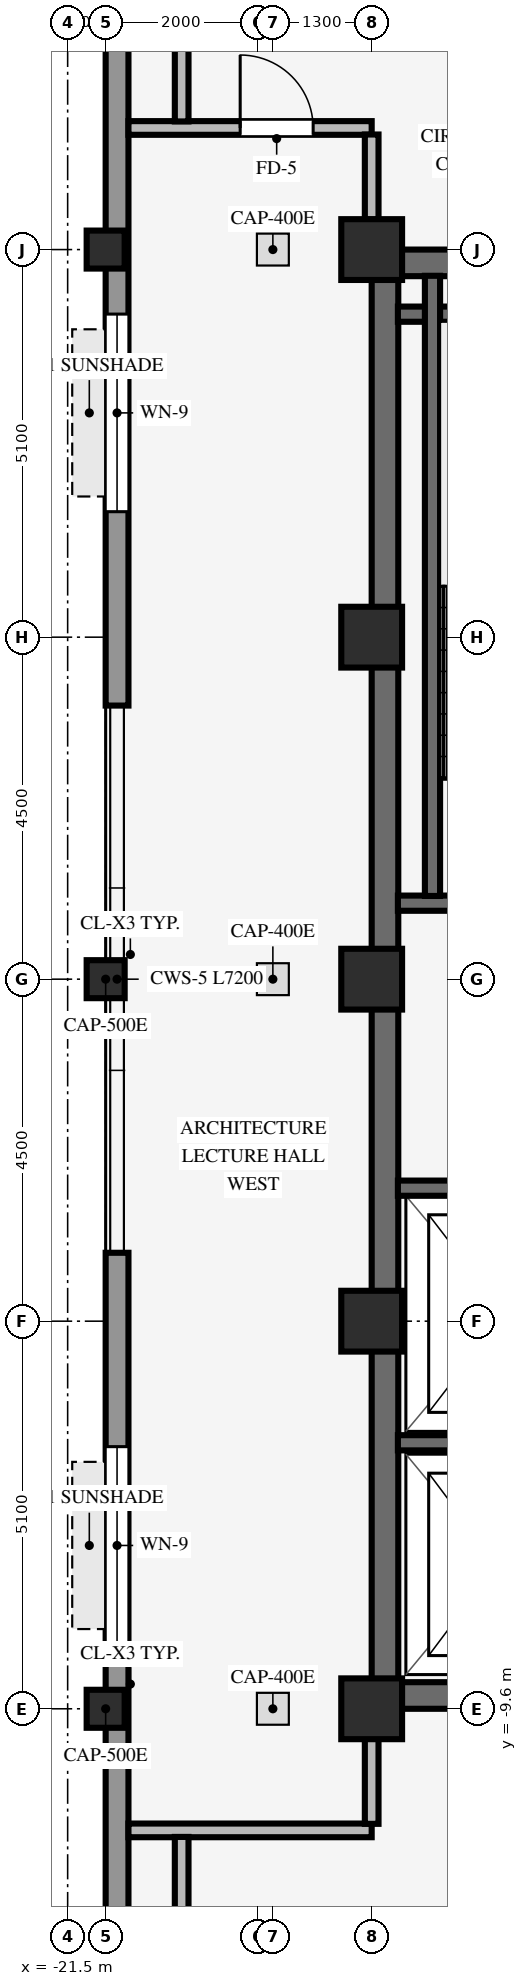
"""IFC4 building model, lengths in metres.
Left out: names, types, materials, properties, quantities, classifications, styles, units other than length and angle.
Written with IfcOpenShell. Run it as: python <this file> out.ifc"""

import sys

from ifc_helpers import new_model, si_unit, direction, frame, frame_2d, origin, origin_2d, place, context, subcontext, project, spatial, rectangle, hollow_rectangle, extrude, source, transform, mapped, element, fill, save


model = new_model("IFC4")
c1 = context("Model", 3, precision=1e-05, world=origin(), true_north=direction((0.0, 1.0)))
c2 = subcontext(c1, "Body", "Model", "MODEL_VIEW")
j1 = project(units=[si_unit("LENGTHUNIT", "METRE"), si_unit("PLANEANGLEUNIT", "RADIAN")], contexts=[c1])
p1 = place(None, origin())
s1 = spatial("IfcSite", under=j1, at=p1, CompositionType="ELEMENT")
p2 = place(p1, origin())
s2 = spatial("IfcBuilding", under=s1, at=p2, CompositionType="ELEMENT")
p3 = place(p2, frame((0.0, 0.0, 283.5)))
s3 = spatial("IfcBuildingStorey", under=s2, at=p3, CompositionType="ELEMENT", Elevation=283.5)
for number, where, z_axis, x_axis in (
    (1, (-17.5, -9.425, 0.0), (0.0, 0.0, 1.0), (1.0, 0.0, 0.0)),
    (2, (-17.5, 9.425, 0.0), (0.0, 0.0, 1.0), (1.0, 0.0, 0.0)),
):
    element("IfcWall", number, at=place(p3, frame(where, z_axis=z_axis, x_axis=x_axis)), inside=s3, PredefinedType="SHEAR", context=c2, shape_type="SweptSolid", body=[
        extrude(rectangle(XDim=8.5, YDim=0.35, at=frame_2d((4.25, 0.0))), origin(), (0.0, 0.0, 1.0), 3.25),
    ])
p4 = place(p3, frame((-17.325, -9.255, 0.0), z_axis=(0.0, 0.0, 1.0), x_axis=(0.0, 1.0, 0.0)))
e3 = element("IfcWall", 3, at=p4, inside=s3, PredefinedType="SHEAR", context=c2, shape_type="SweptSolid", body=[
    extrude(rectangle(XDim=18.51, YDim=0.35, at=frame_2d((9.255, 0.0))), origin(), (0.0, 0.0, 1.0), 3.25),
])
for number, where, z_axis, x_axis in (
    (4, (-17.5, -9.6, 0.0), (0.0, 0.0, 1.0), (1.0, 0.0, 0.0)),
    (5, (-17.5, -4.5, 0.0), (0.0, 0.0, 1.0), (1.0, 0.0, 0.0)),
    (6, (-17.5, 4.5, 0.0), (0.0, 0.0, 1.0), (1.0, 0.0, 0.0)),
    (7, (-17.5, 9.6, 0.0), (0.0, 0.0, 1.0), (1.0, 0.0, 0.0)),
    (8, (-17.5, 0.0, 0.0), (0.0, 0.0, 1.0), (1.0, 0.0, 0.0)),
):
    element("IfcColumn", number, at=place(p3, frame(where, z_axis=z_axis, x_axis=x_axis)), inside=s3, PredefinedType="COLUMN", context=c2, shape_type="SweptSolid", body=[
        extrude(rectangle(XDim=0.8, YDim=0.8, at=origin_2d()), origin(), (0.0, 0.0, 1.0), 3.25),
    ])
for number, where, z_axis, x_axis in (
    (9, (-21.0, -9.6, 0.0), (0.0, 0.0, 1.0), (1.0, 0.0, 0.0)),
    (10, (-21.0, 0.0, 0.0), (0.0, 0.0, 1.0), (1.0, 0.0, 0.0)),
    (11, (-21.0, 9.6, 0.0), (0.0, 0.0, 1.0), (1.0, 0.0, 0.0)),
):
    element("IfcColumn", number, at=place(p3, frame(where, z_axis=z_axis, x_axis=x_axis)), inside=s3, PredefinedType="COLUMN", context=c2, shape_type="SweptSolid", body=[
        extrude(hollow_rectangle(XDim=0.5, YDim=0.5, WallThickness=0.032, InnerFilletRadius=0.032, OuterFilletRadius=0.064, at=origin_2d()), origin(), (0.0, 0.0, 1.0), 3.25),
    ])
p5 = place(p3, frame((-20.85, -17.004, 0.0), z_axis=(0.0, 0.0, 1.0), x_axis=(0.0, 1.0, 0.0)))
e12 = element("IfcWall", 12, at=p5, inside=s3, PredefinedType="STANDARD", context=c2, shape_type="SweptSolid", body=[
    extrude(rectangle(XDim=13.404, YDim=0.3, at=frame_2d((6.702, 0.0))), origin(), (0.0, 0.0, 1.0), 3.24),
])
p6 = place(p5, frame((8.253, 0.0, 0.8)))
e13 = element("IfcOpeningElement", 13, at=p6, cuts=e12, PredefinedType="OPENING", context=c2, shape_type="SweptSolid", body=[
    extrude(rectangle(XDim=2.6, YDim=1.9, at=frame_2d((1.3, 0.95))), frame((0.0, 0.16, 0.0), z_axis=(0.0, -1.0, 0.0), x_axis=(1.0, 0.0, 0.0)), (0.0, 0.0, 1.0), 0.32),
])
p7 = place(p3, frame((-20.85, 3.6, 0.0), z_axis=(0.0, 0.0, 1.0), x_axis=(0.0, 1.0, 0.0)))
e14 = element("IfcWall", 14, at=p7, inside=s3, PredefinedType="STANDARD", context=c2, shape_type="SweptSolid", body=[
    extrude(rectangle(XDim=13.404, YDim=0.3, at=frame_2d((6.702, 0.0))), origin(), (0.0, 0.0, 1.0), 3.24),
])
p8 = place(p7, frame((2.551, 0.0, 0.8)))
e15 = element("IfcOpeningElement", 15, at=p8, cuts=e14, PredefinedType="OPENING", context=c2, shape_type="SweptSolid", body=[
    extrude(rectangle(XDim=2.6, YDim=1.9, at=frame_2d((1.3, 0.95))), frame((0.0, 0.16, 0.0), z_axis=(0.0, -1.0, 0.0), x_axis=(1.0, 0.0, 0.0)), (0.0, 0.0, 1.0), 0.32),
])
for number, where, z_axis, x_axis in (
    (16, (-17.155, 1.0, 0.0), (0.0, 0.0, 1.0), (1.0, 0.0, 0.0)),
    (17, (-17.155, 8.75, 0.0), (0.0, 0.0, 1.0), (1.0, 0.0, 0.0)),
):
    element("IfcWall", number, at=place(p3, frame(where, z_axis=z_axis, x_axis=x_axis)), inside=s3, PredefinedType="SHEAR", context=c2, shape_type="SweptSolid", body=[
        extrude(rectangle(XDim=3.62, YDim=0.2, at=frame_2d((1.81, 0.0))), origin(), (0.0, 0.0, 1.0), 3.25),
    ])
p9 = place(p3, frame((-16.7, 1.095, 0.0), z_axis=(0.0, 0.0, 1.0), x_axis=(0.0, 1.0, 0.0)))
e18 = element("IfcWall", 18, at=p9, inside=s3, PredefinedType="SHEAR", context=c2, shape_type="SweptSolid", body=[
    extrude(rectangle(XDim=8.16, YDim=0.2, at=frame_2d((4.08, 0.0))), origin(), (0.0, 0.0, 1.0), 3.25),
])
p10 = place(p3, frame((-17.155, -6.1, 0.0), z_axis=(0.0, 0.0, 1.0), x_axis=(1.0, 0.0, 0.0)))
e19 = element("IfcWall", 19, at=p10, inside=s3, PredefinedType="SHEAR", context=c2, shape_type="SweptSolid", body=[
    extrude(rectangle(XDim=2.905, YDim=0.2, at=frame_2d((1.453, 0.0))), origin(), (0.0, 0.0, 1.0), 3.25),
])
p11 = place(p3, frame((-17.155, -2.75, 0.0), z_axis=(0.0, 0.0, 1.0), x_axis=(1.0, 0.0, 0.0)))
e20 = element("IfcWall", 20, at=p11, inside=s3, PredefinedType="SHEAR", context=c2, shape_type="SweptSolid", body=[
    extrude(rectangle(XDim=2.71, YDim=0.2, at=frame_2d((1.355, 0.0))), origin(), (0.0, 0.0, 1.0), 3.25),
])
p12 = place(p3, frame((-20.7, -11.2, 0.0), z_axis=(0.0, 0.0, 1.0), x_axis=(1.0, 0.0, 0.0)))
e21 = element("IfcWall", 21, at=p12, inside=s3, PredefinedType="PARTITIONING", context=c2, shape_type="SweptSolid", body=[
    extrude(rectangle(XDim=3.2, YDim=0.18, at=frame_2d((1.6, 0.0))), origin(), (0.0, 0.0, 1.0), 3.24),
])
p13 = place(p3, frame((-20.7, 11.2, 0.0), z_axis=(0.0, 0.0, 1.0), x_axis=(1.0, 0.0, 0.0)))
e22 = element("IfcWall", 22, at=p13, inside=s3, PredefinedType="PARTITIONING", context=c2, shape_type="SweptSolid", body=[
    extrude(rectangle(XDim=3.2, YDim=0.18, at=frame_2d((1.6, 0.0))), origin(), (0.0, 0.0, 1.0), 3.24),
])
p14 = place(p13, frame((1.47, 0.0, 0.0)))
e23 = element("IfcOpeningElement", 23, at=p14, cuts=e22, PredefinedType="OPENING", context=c2, shape_type="SweptSolid", body=[
    extrude(rectangle(XDim=0.96, YDim=2.1, at=frame_2d((0.48, 1.05))), frame((0.0, 0.1, 0.0), z_axis=(0.0, -1.0, 0.0), x_axis=(1.0, 0.0, 0.0)), (0.0, 0.0, 1.0), 0.2),
])
for number, where, z_axis, x_axis in (
    (24, (-20.0, -13.514, 0.0), (0.0, 0.0, 1.0), (0.0, 1.0, 0.0)),
    (25, (-20.0, 11.286, 0.0), (0.0, 0.0, 1.0), (0.0, 1.0, 0.0)),
):
    element("IfcWall", number, at=place(p3, frame(where, z_axis=z_axis, x_axis=x_axis)), inside=s3, PredefinedType="PARTITIONING", context=c2, shape_type="SweptSolid", body=[
        extrude(rectangle(XDim=2.228, YDim=0.18, at=frame_2d((1.114, 0.0))), origin(), (0.0, 0.0, 1.0), 3.24),
    ])
for number, where, z_axis, x_axis in (
    (26, (-17.5, -11.114, 0.0), (0.0, 0.0, 1.0), (0.0, 1.0, 0.0)),
    (27, (-17.5, 9.996, 0.0), (0.0, 0.0, 1.0), (0.0, 1.0, 0.0)),
):
    element("IfcWall", number, at=place(p3, frame(where, z_axis=z_axis, x_axis=x_axis)), inside=s3, PredefinedType="PARTITIONING", context=c2, shape_type="SweptSolid", body=[
        extrude(rectangle(XDim=1.118, YDim=0.18, at=frame_2d((0.559, 0.0))), origin(), (0.0, 0.0, 1.0), 3.24),
    ])
m1 = source(origin(), c2, "Body", "SweptSolid", [
    extrude(rectangle(XDim=2.6, YDim=1.9, at=frame_2d((1.3, 0.95))), frame((0.0, 0.03, 0.0), z_axis=(0.0, -1.0, 0.0), x_axis=(1.0, 0.0, 0.0)), (0.0, 0.0, 1.0), 0.06),
])
p15 = place(p6, origin())
e28 = element("IfcWindow", 28, at=p15, inside=s3, PartitioningType="SINGLE_PANEL", PredefinedType="WINDOW", context=c2, shape_type="MappedRepresentation", body=[
    mapped(m1, transform((0.0, 0.0, 0.0), scale=1.0)),
])
fill(e13, e28)
p16 = place(p8, origin())
e29 = element("IfcWindow", 29, at=p16, inside=s3, PartitioningType="SINGLE_PANEL", PredefinedType="WINDOW", context=c2, shape_type="MappedRepresentation", body=[
    mapped(m1, transform((0.0, 0.0, 0.0), scale=1.0)),
])
fill(e15, e29)
m2 = source(origin(), c2, "Body", "SweptSolid", [
    extrude(rectangle(XDim=0.96, YDim=2.1, at=frame_2d((0.48, 1.05))), frame((0.0, 0.025, 0.0), z_axis=(0.0, -1.0, 0.0), x_axis=(1.0, 0.0, 0.0)), (0.0, 0.0, 1.0), 0.05),
])
p17 = place(p14, origin())
e30 = element("IfcDoor", 30, at=p17, inside=s3, OperationType="SINGLE_SWING_LEFT", PredefinedType="DOOR", context=c2, shape_type="MappedRepresentation", body=[
    mapped(m2, transform((0.0, 0.0, 0.0), scale=1.0)),
])
fill(e23, e30)
save(model, sys.argv[1])
